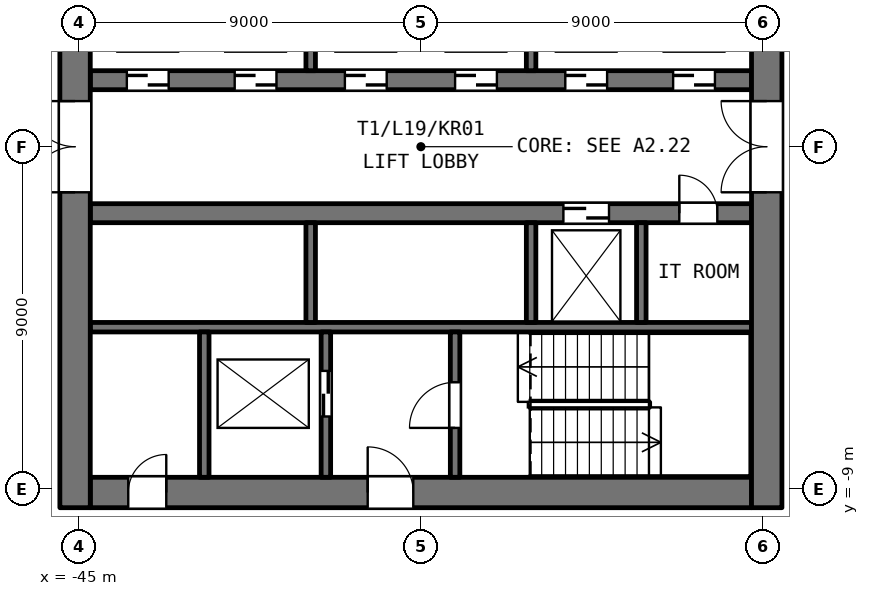
"""IFC4 building model, lengths in metres.
Left out: names, types, materials, properties, quantities, classifications, styles, units other than length and angle.
Written with IfcOpenShell. Run it as: python <this file> out.ifc"""

import sys

from ifc_helpers import new_model, si_unit, direction, frame, frame_2d, origin, place, context, subcontext, project, spatial, rectangle, extrude, element, fill, save


model = new_model("IFC4")
c1 = context("Model", 3, precision=1e-05, world=origin(), true_north=direction((0.0, 1.0)))
c2 = subcontext(c1, "Body", "Model", "MODEL_VIEW")
j1 = project(units=[si_unit("LENGTHUNIT", "METRE"), si_unit("PLANEANGLEUNIT", "RADIAN")], contexts=[c1])
p1 = place(None, origin())
s1 = spatial("IfcSite", under=j1, at=p1, CompositionType="ELEMENT")
p2 = place(p1, origin())
s2 = spatial("IfcBuilding", under=s1, at=p2, CompositionType="ELEMENT")
p3 = place(p2, frame((0.0, 0.0, 84.0)))
s3 = spatial("IfcBuildingStorey", under=s2, at=p3, CompositionType="ELEMENT", Elevation=84.0)
p4 = place(p3, frame((-44.7, -9.1, 0.0), z_axis=(0.0, 0.0, 1.0), x_axis=(1.0, 0.0, 0.0)))
e1 = element("IfcWall", 1, at=p4, inside=s3, PredefinedType="SHEAR", context=c2, shape_type="SweptSolid", body=[
    extrude(rectangle(XDim=17.4, YDim=0.8, at=frame_2d((8.7, 0.0))), origin(), (0.0, 0.0, 1.0), 3.6),
])
p5 = place(p4, frame((7.3, 0.0, 0.0)))
e2 = element("IfcOpeningElement", 2, at=p5, cuts=e1, PredefinedType="OPENING", context=c2, shape_type="SweptSolid", body=[
    extrude(rectangle(XDim=1.2, YDim=2.1, at=frame_2d((0.6, 1.05))), frame((0.0, 0.41, 0.0), z_axis=(0.0, -1.0, 0.0), x_axis=(1.0, 0.0, 0.0)), (0.0, 0.0, 1.0), 0.82),
])
p6 = place(p4, frame((1.0, 0.0, 0.0)))
e3 = element("IfcOpeningElement", 3, at=p6, cuts=e1, PredefinedType="OPENING", context=c2, shape_type="SweptSolid", body=[
    extrude(rectangle(XDim=1.0, YDim=2.1, at=frame_2d((0.5, 1.05))), frame((0.0, 0.41, 0.0), z_axis=(0.0, -1.0, 0.0), x_axis=(1.0, 0.0, 0.0)), (0.0, 0.0, 1.0), 0.82),
])
p7 = place(p3, frame((-44.7, -4.75, 0.0), z_axis=(0.0, 0.0, 1.0), x_axis=(1.0, 0.0, 0.0)))
e4 = element("IfcWall", 4, at=p7, inside=s3, PredefinedType="SHEAR", context=c2, shape_type="SweptSolid", body=[
    extrude(rectangle(XDim=17.4, YDim=0.25, at=frame_2d((8.7, 0.0))), origin(), (0.0, 0.0, 1.0), 3.6),
])
p8 = place(p3, frame((-44.7, -1.75, 0.0), z_axis=(0.0, 0.0, 1.0), x_axis=(1.0, 0.0, 0.0)))
e5 = element("IfcWall", 5, at=p8, inside=s3, PredefinedType="SHEAR", context=c2, shape_type="SweptSolid", body=[
    extrude(rectangle(XDim=17.4, YDim=0.5, at=frame_2d((8.7, 0.0))), origin(), (0.0, 0.0, 1.0), 3.6),
])
p9 = place(p8, frame((12.45, 0.0, 0.0)))
e6 = element("IfcOpeningElement", 6, at=p9, cuts=e5, PredefinedType="OPENING", context=c2, shape_type="SweptSolid", body=[
    extrude(rectangle(XDim=1.2, YDim=2.1, at=frame_2d((0.6, 1.05))), frame((0.0, 0.26, 0.0), z_axis=(0.0, -1.0, 0.0), x_axis=(1.0, 0.0, 0.0)), (0.0, 0.0, 1.0), 0.52),
])
p10 = place(p8, frame((15.5, 0.0, 0.0)))
e7 = element("IfcOpeningElement", 7, at=p10, cuts=e5, PredefinedType="OPENING", context=c2, shape_type="SweptSolid", body=[
    extrude(rectangle(XDim=1.0, YDim=2.1, at=frame_2d((0.5, 1.05))), frame((0.0, 0.26, 0.0), z_axis=(0.0, -1.0, 0.0), x_axis=(1.0, 0.0, 0.0)), (0.0, 0.0, 1.0), 0.52),
])
p11 = place(p3, frame((-44.7, 1.75, 0.0), z_axis=(0.0, 0.0, 1.0), x_axis=(1.0, 0.0, 0.0)))
e8 = element("IfcWall", 8, at=p11, inside=s3, PredefinedType="SHEAR", context=c2, shape_type="SweptSolid", body=[
    extrude(rectangle(XDim=17.4, YDim=0.5, at=frame_2d((8.7, 0.0))), origin(), (0.0, 0.0, 1.0), 3.6),
])
p12 = place(p11, frame((0.962, 0.0, 0.0)))
e9 = element("IfcOpeningElement", 9, at=p12, cuts=e8, PredefinedType="OPENING", context=c2, shape_type="SweptSolid", body=[
    extrude(rectangle(XDim=1.1, YDim=2.1, at=frame_2d((0.55, 1.05))), frame((0.0, 0.26, 0.0), z_axis=(0.0, -1.0, 0.0), x_axis=(1.0, 0.0, 0.0)), (0.0, 0.0, 1.0), 0.52),
])
p13 = place(p11, frame((3.8, 0.0, 0.0)))
e10 = element("IfcOpeningElement", 10, at=p13, cuts=e8, PredefinedType="OPENING", context=c2, shape_type="SweptSolid", body=[
    extrude(rectangle(XDim=1.1, YDim=2.1, at=frame_2d((0.55, 1.05))), frame((0.0, 0.26, 0.0), z_axis=(0.0, -1.0, 0.0), x_axis=(1.0, 0.0, 0.0)), (0.0, 0.0, 1.0), 0.52),
])
p14 = place(p11, frame((6.7, 0.0, 0.0)))
e11 = element("IfcOpeningElement", 11, at=p14, cuts=e8, PredefinedType="OPENING", context=c2, shape_type="SweptSolid", body=[
    extrude(rectangle(XDim=1.1, YDim=2.1, at=frame_2d((0.55, 1.05))), frame((0.0, 0.26, 0.0), z_axis=(0.0, -1.0, 0.0), x_axis=(1.0, 0.0, 0.0)), (0.0, 0.0, 1.0), 0.52),
])
p15 = place(p11, frame((9.6, 0.0, 0.0)))
e12 = element("IfcOpeningElement", 12, at=p15, cuts=e8, PredefinedType="OPENING", context=c2, shape_type="SweptSolid", body=[
    extrude(rectangle(XDim=1.1, YDim=2.1, at=frame_2d((0.55, 1.05))), frame((0.0, 0.26, 0.0), z_axis=(0.0, -1.0, 0.0), x_axis=(1.0, 0.0, 0.0)), (0.0, 0.0, 1.0), 0.52),
])
p16 = place(p11, frame((12.5, 0.0, 0.0)))
e13 = element("IfcOpeningElement", 13, at=p16, cuts=e8, PredefinedType="OPENING", context=c2, shape_type="SweptSolid", body=[
    extrude(rectangle(XDim=1.1, YDim=2.1, at=frame_2d((0.55, 1.05))), frame((0.0, 0.26, 0.0), z_axis=(0.0, -1.0, 0.0), x_axis=(1.0, 0.0, 0.0)), (0.0, 0.0, 1.0), 0.52),
])
p17 = place(p11, frame((15.337, 0.0, 0.0)))
e14 = element("IfcOpeningElement", 14, at=p17, cuts=e8, PredefinedType="OPENING", context=c2, shape_type="SweptSolid", body=[
    extrude(rectangle(XDim=1.1, YDim=2.1, at=frame_2d((0.55, 1.05))), frame((0.0, 0.26, 0.0), z_axis=(0.0, -1.0, 0.0), x_axis=(1.0, 0.0, 0.0)), (0.0, 0.0, 1.0), 0.52),
])
p18 = place(p3, frame((-45.1, -9.5, 0.0), z_axis=(0.0, 0.0, 1.0), x_axis=(0.0, 1.0, 0.0)))
e15 = element("IfcWall", 15, at=p18, inside=s3, PredefinedType="SHEAR", context=c2, shape_type="SweptSolid", body=[
    extrude(rectangle(XDim=19.0, YDim=0.8, at=frame_2d((9.5, 0.0))), origin(), (0.0, 0.0, 1.0), 3.6),
])
p19 = place(p18, frame((8.3, 0.0, 0.0)))
e16 = element("IfcOpeningElement", 16, at=p19, cuts=e15, PredefinedType="OPENING", context=c2, shape_type="SweptSolid", body=[
    extrude(rectangle(XDim=2.4, YDim=2.1, at=frame_2d((1.2, 1.05))), frame((0.0, 0.41, 0.0), z_axis=(0.0, -1.0, 0.0), x_axis=(1.0, 0.0, 0.0)), (0.0, 0.0, 1.0), 0.82),
])
p20 = place(p3, frame((-41.7, -8.7, 0.0), z_axis=(0.0, 0.0, 1.0), x_axis=(0.0, 1.0, 0.0)))
e17 = element("IfcWall", 17, at=p20, inside=s3, PredefinedType="SHEAR", context=c2, shape_type="SweptSolid", body=[
    extrude(rectangle(XDim=3.825, YDim=0.25, at=frame_2d((1.913, 0.0))), origin(), (0.0, 0.0, 1.0), 3.6),
])
for number, where, z_axis, x_axis in (
    (18, (-38.9, -4.625, 0.0), (0.0, 0.0, 1.0), (0.0, 1.0, 0.0)),
    (19, (-38.9, 2.0, 0.0), (0.0, 0.0, 1.0), (0.0, 1.0, 0.0)),
):
    element("IfcWall", number, at=place(p3, frame(where, z_axis=z_axis, x_axis=x_axis)), inside=s3, PredefinedType="SHEAR", context=c2, shape_type="SweptSolid", body=[
        extrude(rectangle(XDim=2.625, YDim=0.25, at=frame_2d((1.312, 0.0))), origin(), (0.0, 0.0, 1.0), 3.6),
    ])
p21 = place(p3, frame((-38.5, -8.7, 0.0), z_axis=(0.0, 0.0, 1.0), x_axis=(0.0, 1.0, 0.0)))
e20 = element("IfcWall", 20, at=p21, inside=s3, PredefinedType="SHEAR", context=c2, shape_type="SweptSolid", body=[
    extrude(rectangle(XDim=3.825, YDim=0.25, at=frame_2d((1.913, 0.0))), origin(), (0.0, 0.0, 1.0), 3.6),
])
p22 = place(p21, frame((1.6, 0.0, 0.0)))
e21 = element("IfcOpeningElement", 21, at=p22, cuts=e20, PredefinedType="OPENING", context=c2, shape_type="SweptSolid", body=[
    extrude(rectangle(XDim=1.2, YDim=2.1, at=frame_2d((0.6, 1.05))), frame((0.0, 0.135, 0.0), z_axis=(0.0, -1.0, 0.0), x_axis=(1.0, 0.0, 0.0)), (0.0, 0.0, 1.0), 0.27),
])
p23 = place(p3, frame((-35.1, -8.7, 0.0), z_axis=(0.0, 0.0, 1.0), x_axis=(0.0, 1.0, 0.0)))
e22 = element("IfcWall", 22, at=p23, inside=s3, PredefinedType="SHEAR", context=c2, shape_type="SweptSolid", body=[
    extrude(rectangle(XDim=3.825, YDim=0.25, at=frame_2d((1.913, 0.0))), origin(), (0.0, 0.0, 1.0), 3.6),
])
p24 = place(p23, frame((1.3, 0.0, 0.0)))
e23 = element("IfcOpeningElement", 23, at=p24, cuts=e22, PredefinedType="OPENING", context=c2, shape_type="SweptSolid", body=[
    extrude(rectangle(XDim=1.2, YDim=2.1, at=frame_2d((0.6, 1.05))), frame((0.0, 0.135, 0.0), z_axis=(0.0, -1.0, 0.0), x_axis=(1.0, 0.0, 0.0)), (0.0, 0.0, 1.0), 0.27),
])
for number, where, z_axis, x_axis in (
    (24, (-33.1, -4.625, 0.0), (0.0, 0.0, 1.0), (0.0, 1.0, 0.0)),
    (25, (-33.1, 2.0, 0.0), (0.0, 0.0, 1.0), (0.0, 1.0, 0.0)),
    (26, (-30.2, -4.625, 0.0), (0.0, 0.0, 1.0), (0.0, 1.0, 0.0)),
):
    element("IfcWall", number, at=place(p3, frame(where, z_axis=z_axis, x_axis=x_axis)), inside=s3, PredefinedType="SHEAR", context=c2, shape_type="SweptSolid", body=[
        extrude(rectangle(XDim=2.625, YDim=0.25, at=frame_2d((1.312, 0.0))), origin(), (0.0, 0.0, 1.0), 3.6),
    ])
p25 = place(p3, frame((-26.9, -9.5, 0.0), z_axis=(0.0, 0.0, 1.0), x_axis=(0.0, 1.0, 0.0)))
e27 = element("IfcWall", 27, at=p25, inside=s3, PredefinedType="SHEAR", context=c2, shape_type="SweptSolid", body=[
    extrude(rectangle(XDim=19.0, YDim=0.8, at=frame_2d((9.5, 0.0))), origin(), (0.0, 0.0, 1.0), 3.6),
])
p26 = place(p25, frame((8.3, 0.0, 0.0)))
e28 = element("IfcOpeningElement", 28, at=p26, cuts=e27, PredefinedType="OPENING", context=c2, shape_type="SweptSolid", body=[
    extrude(rectangle(XDim=2.4, YDim=2.1, at=frame_2d((1.2, 1.05))), frame((0.0, 0.41, 0.0), z_axis=(0.0, -1.0, 0.0), x_axis=(1.0, 0.0, 0.0)), (0.0, 0.0, 1.0), 0.82),
])
p27 = place(p3, frame((-29.452, -15.809, 0.0), z_axis=(0.0, 0.0, 1.0), x_axis=(0.707106781187, 0.707106781187, 0.0)))
e29 = element("IfcWall", 29, at=p27, inside=s3, PredefinedType="PARTITIONING", context=c2, shape_type="SweptSolid", body=[
    extrude(rectangle(XDim=13.096, YDim=0.125, at=frame_2d((6.548, 0.0))), origin(), (0.0, 0.0, 1.0), 3.0),
])
p28 = place(p27, frame((5.648, 0.0, 0.0)))
e30 = element("IfcOpeningElement", 30, at=p28, cuts=e29, PredefinedType="OPENING", context=c2, shape_type="SweptSolid", body=[
    extrude(rectangle(XDim=1.8, YDim=2.1, at=frame_2d((0.9, 1.05))), frame((0.0, 0.073, 0.0), z_axis=(0.0, -1.0, 0.0), x_axis=(1.0, 0.0, 0.0)), (0.0, 0.0, 1.0), 0.145),
])
p29 = place(p19, origin())
e31 = element("IfcDoor", 31, at=p29, inside=s3, OperationType="DOUBLE_DOOR_SINGLE_SWING", PredefinedType="DOOR", context=c2, shape_type="SweptSolid", body=[
    extrude(rectangle(XDim=2.4, YDim=2.1, at=frame_2d((1.2, 1.05))), frame((0.0, -0.225, 0.0), z_axis=(0.0, -1.0, 0.0), x_axis=(1.0, 0.0, 0.0)), (0.0, 0.0, 1.0), 0.05),
])
fill(e16, e31)
p30 = place(p26, origin())
e32 = element("IfcDoor", 32, at=p30, inside=s3, OperationType="DOUBLE_DOOR_SINGLE_SWING", PredefinedType="DOOR", context=c2, shape_type="SweptSolid", body=[
    extrude(rectangle(XDim=2.4, YDim=2.1, at=frame_2d((1.2, 1.05))), frame((0.0, 0.275, 0.0), z_axis=(0.0, -1.0, 0.0), x_axis=(1.0, 0.0, 0.0)), (0.0, 0.0, 1.0), 0.05),
])
fill(e28, e32)
p31 = place(p12, origin())
e33 = element("IfcDoor", 33, at=p31, inside=s3, OperationType="SLIDING_TO_LEFT", PredefinedType="DOOR", context=c2, shape_type="SweptSolid", body=[
    extrude(rectangle(XDim=1.1, YDim=2.1, at=frame_2d((0.55, 1.05))), frame((0.0, 0.025, 0.0), z_axis=(0.0, -1.0, 0.0), x_axis=(1.0, 0.0, 0.0)), (0.0, 0.0, 1.0), 0.05),
])
fill(e9, e33)
p32 = place(p13, origin())
e34 = element("IfcDoor", 34, at=p32, inside=s3, OperationType="SLIDING_TO_LEFT", PredefinedType="DOOR", context=c2, shape_type="SweptSolid", body=[
    extrude(rectangle(XDim=1.1, YDim=2.1, at=frame_2d((0.55, 1.05))), frame((0.0, 0.025, 0.0), z_axis=(0.0, -1.0, 0.0), x_axis=(1.0, 0.0, 0.0)), (0.0, 0.0, 1.0), 0.05),
])
fill(e10, e34)
p33 = place(p14, origin())
e35 = element("IfcDoor", 35, at=p33, inside=s3, OperationType="SLIDING_TO_LEFT", PredefinedType="DOOR", context=c2, shape_type="SweptSolid", body=[
    extrude(rectangle(XDim=1.1, YDim=2.1, at=frame_2d((0.55, 1.05))), frame((0.0, 0.025, 0.0), z_axis=(0.0, -1.0, 0.0), x_axis=(1.0, 0.0, 0.0)), (0.0, 0.0, 1.0), 0.05),
])
fill(e11, e35)
p34 = place(p15, origin())
e36 = element("IfcDoor", 36, at=p34, inside=s3, OperationType="SLIDING_TO_LEFT", PredefinedType="DOOR", context=c2, shape_type="SweptSolid", body=[
    extrude(rectangle(XDim=1.1, YDim=2.1, at=frame_2d((0.55, 1.05))), frame((0.0, 0.025, 0.0), z_axis=(0.0, -1.0, 0.0), x_axis=(1.0, 0.0, 0.0)), (0.0, 0.0, 1.0), 0.05),
])
fill(e12, e36)
p35 = place(p16, origin())
e37 = element("IfcDoor", 37, at=p35, inside=s3, OperationType="SLIDING_TO_LEFT", PredefinedType="DOOR", context=c2, shape_type="SweptSolid", body=[
    extrude(rectangle(XDim=1.1, YDim=2.1, at=frame_2d((0.55, 1.05))), frame((0.0, 0.025, 0.0), z_axis=(0.0, -1.0, 0.0), x_axis=(1.0, 0.0, 0.0)), (0.0, 0.0, 1.0), 0.05),
])
fill(e13, e37)
p36 = place(p17, origin())
e38 = element("IfcDoor", 38, at=p36, inside=s3, OperationType="SLIDING_TO_LEFT", PredefinedType="DOOR", context=c2, shape_type="SweptSolid", body=[
    extrude(rectangle(XDim=1.1, YDim=2.1, at=frame_2d((0.55, 1.05))), frame((0.0, 0.025, 0.0), z_axis=(0.0, -1.0, 0.0), x_axis=(1.0, 0.0, 0.0)), (0.0, 0.0, 1.0), 0.05),
])
fill(e14, e38)
p37 = place(p9, origin())
e39 = element("IfcDoor", 39, at=p37, inside=s3, OperationType="SLIDING_TO_LEFT", PredefinedType="DOOR", context=c2, shape_type="SweptSolid", body=[
    extrude(rectangle(XDim=1.2, YDim=2.1, at=frame_2d((0.6, 1.05))), frame((0.0, 0.025, 0.0), z_axis=(0.0, -1.0, 0.0), x_axis=(1.0, 0.0, 0.0)), (0.0, 0.0, 1.0), 0.05),
])
fill(e6, e39)
p38 = place(p22, origin())
e40 = element("IfcDoor", 40, at=p38, inside=s3, OperationType="SLIDING_TO_LEFT", PredefinedType="DOOR", context=c2, shape_type="SweptSolid", body=[
    extrude(rectangle(XDim=1.2, YDim=2.1, at=frame_2d((0.6, 1.05))), frame((0.0, 0.025, 0.0), z_axis=(0.0, -1.0, 0.0), x_axis=(1.0, 0.0, 0.0)), (0.0, 0.0, 1.0), 0.05),
])
fill(e21, e40)
p39 = place(p10, origin())
e41 = element("IfcDoor", 41, at=p39, inside=s3, OperationType="SINGLE_SWING_LEFT", PredefinedType="DOOR", context=c2, shape_type="SweptSolid", body=[
    extrude(rectangle(XDim=1.0, YDim=2.1, at=frame_2d((0.5, 1.05))), frame((0.0, 0.025, 0.0), z_axis=(0.0, -1.0, 0.0), x_axis=(1.0, 0.0, 0.0)), (0.0, 0.0, 1.0), 0.05),
])
fill(e7, e41)
p40 = place(p24, origin())
e42 = element("IfcDoor", 42, at=p40, inside=s3, OperationType="SINGLE_SWING_LEFT", PredefinedType="DOOR", context=c2, shape_type="SweptSolid", body=[
    extrude(rectangle(XDim=1.2, YDim=2.1, at=frame_2d((0.6, 1.05))), frame((0.0, 0.025, 0.0), z_axis=(0.0, -1.0, 0.0), x_axis=(1.0, 0.0, 0.0)), (0.0, 0.0, 1.0), 0.05),
])
fill(e23, e42)
p41 = place(p5, origin())
e43 = element("IfcDoor", 43, at=p41, inside=s3, OperationType="SINGLE_SWING_LEFT", PredefinedType="DOOR", context=c2, shape_type="SweptSolid", body=[
    extrude(rectangle(XDim=1.2, YDim=2.1, at=frame_2d((0.6, 1.05))), frame((0.0, 0.275, 0.0), z_axis=(0.0, -1.0, 0.0), x_axis=(1.0, 0.0, 0.0)), (0.0, 0.0, 1.0), 0.05),
])
fill(e2, e43)
p42 = place(p6, origin())
e44 = element("IfcDoor", 44, at=p42, inside=s3, OperationType="SINGLE_SWING_RIGHT", PredefinedType="DOOR", context=c2, shape_type="SweptSolid", body=[
    extrude(rectangle(XDim=1.0, YDim=2.1, at=frame_2d((0.5, 1.05))), frame((0.0, 0.275, 0.0), z_axis=(0.0, -1.0, 0.0), x_axis=(1.0, 0.0, 0.0)), (0.0, 0.0, 1.0), 0.05),
])
fill(e3, e44)
save(model, sys.argv[1])
